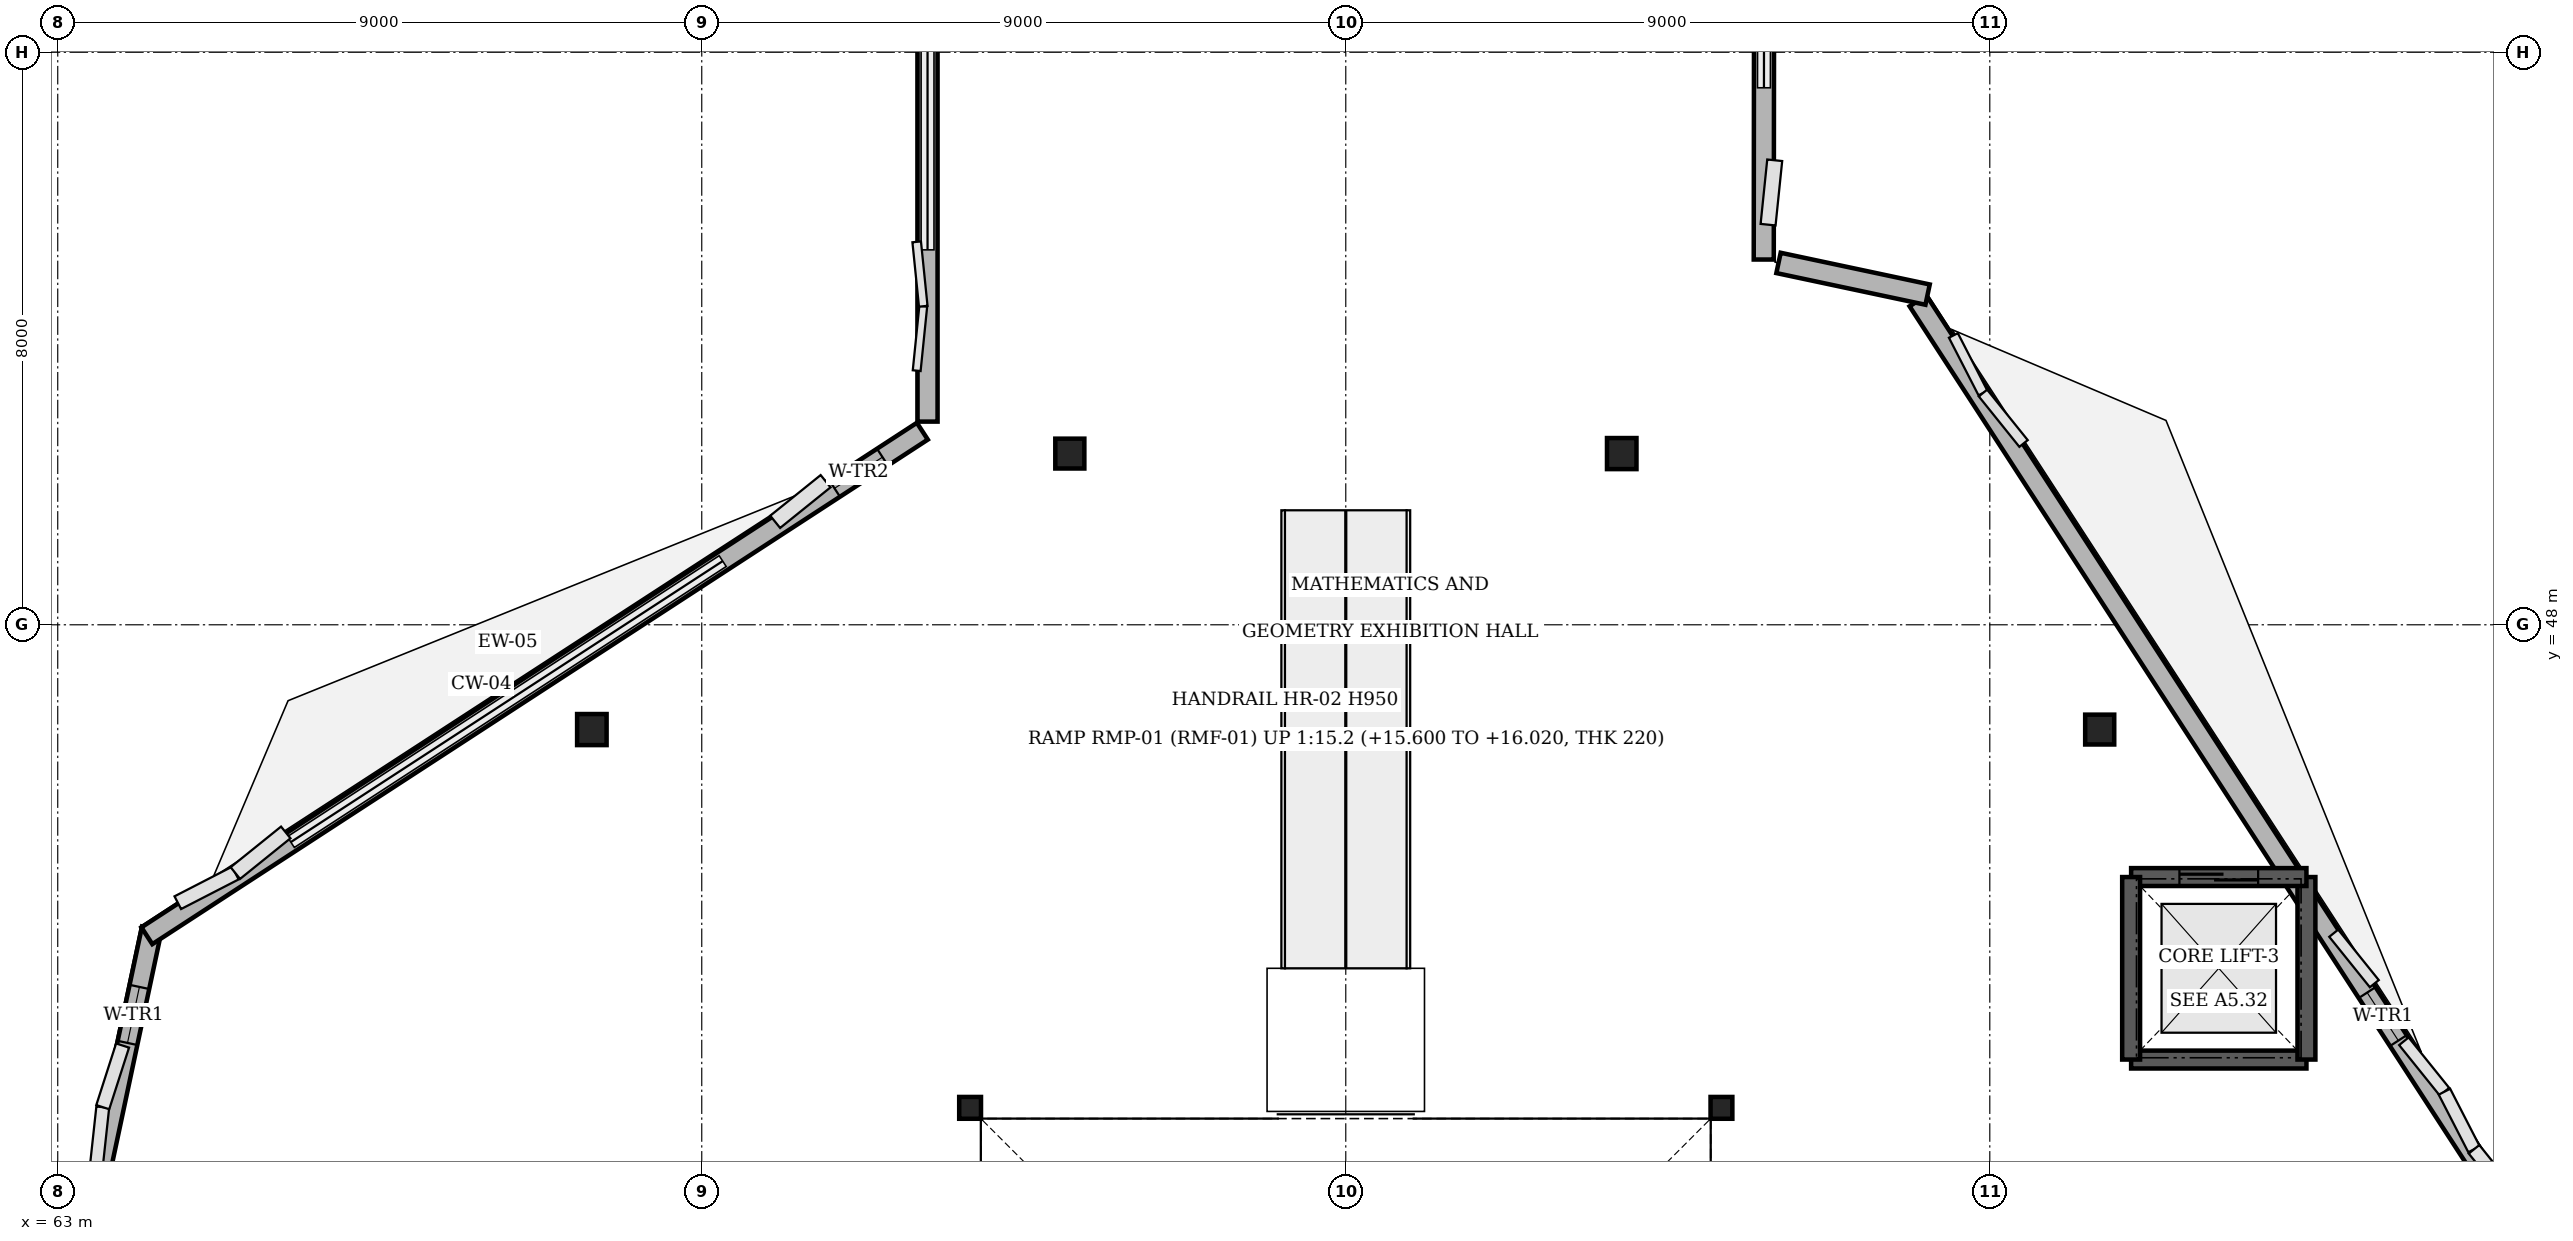
"""IFC4 building model, lengths in metres.
Left out: names, types, materials, properties, quantities, classifications, styles, units other than length and angle.
Written with IfcOpenShell. Run it as: python <this file> out.ifc"""

import sys

from ifc_helpers import new_model, si_unit, direction, frame, frame_2d, origin, origin_2d, place, context, subcontext, project, spatial, rectangle, hollow_rectangle, i_section, extrude, element, fill, save


model = new_model("IFC4")
c1 = context("Model", 3, precision=1e-05, world=origin(), true_north=direction((0.0, 1.0)))
c2 = subcontext(c1, "Body", "Model", "MODEL_VIEW")
j1 = project(units=[si_unit("LENGTHUNIT", "METRE"), si_unit("PLANEANGLEUNIT", "RADIAN")], contexts=[c1])
p1 = place(None, origin())
s1 = spatial("IfcSite", under=j1, at=p1, CompositionType="ELEMENT")
p2 = place(p1, origin())
s2 = spatial("IfcBuilding", under=s1, at=p2, CompositionType="ELEMENT")
p3 = place(p2, frame((0.0, 0.0, 15.6)))
s3 = spatial("IfcBuildingStorey", under=s2, at=p3, CompositionType="ELEMENT", Elevation=15.6)
p4 = place(p3, frame((91.536, 46.536, 0.0), z_axis=(0.0, 0.0, 1.0), x_axis=(1.0, 0.0, 0.0)))
e1 = element("IfcColumn", 1, at=p4, inside=s3, PredefinedType="COLUMN", context=c2, shape_type="SweptSolid", body=[
    extrude(i_section(OverallWidth=0.406, OverallDepth=0.417, WebThickness=0.03, FlangeThickness=0.044, FilletRadius=0.015, at=origin_2d()), origin(), (0.0, 0.0, 1.0), 4.8),
])
p5 = place(p3, frame((84.856, 50.392, 0.0), z_axis=(0.0, 0.0, 1.0), x_axis=(1.0, 0.0, 0.0)))
e2 = element("IfcColumn", 2, at=p5, inside=s3, PredefinedType="COLUMN", context=c2, shape_type="SweptSolid", body=[
    extrude(i_section(OverallWidth=0.412, OverallDepth=0.434, WebThickness=0.036, FlangeThickness=0.044, FilletRadius=0.015, at=origin_2d()), origin(), (0.0, 0.0, 1.0), 4.8),
])
p6 = place(p3, frame((77.144, 50.392, 0.0), z_axis=(0.0, 0.0, 1.0), x_axis=(1.0, 0.0, 0.0)))
e3 = element("IfcColumn", 3, at=p6, inside=s3, PredefinedType="COLUMN", context=c2, shape_type="SweptSolid", body=[
    extrude(i_section(OverallWidth=0.406, OverallDepth=0.417, WebThickness=0.03, FlangeThickness=0.044, FilletRadius=0.015, at=origin_2d()), origin(), (0.0, 0.0, 1.0), 4.8),
])
p7 = place(p3, frame((70.464, 46.536, 0.0), z_axis=(0.0, 0.0, 1.0), x_axis=(1.0, 0.0, 0.0)))
e4 = element("IfcColumn", 4, at=p7, inside=s3, PredefinedType="COLUMN", context=c2, shape_type="SweptSolid", body=[
    extrude(i_section(OverallWidth=0.412, OverallDepth=0.434, WebThickness=0.036, FlangeThickness=0.044, FilletRadius=0.015, at=origin_2d()), origin(), (0.0, 0.0, 1.0), 4.8),
])
for number, where, z_axis, x_axis in (
    (5, (86.25, 41.25, 0.0), (0.0, 0.0, 1.0), (1.0, 0.0, 0.0)),
    (6, (75.75, 41.25, 0.0), (0.0, 0.0, 1.0), (1.0, 0.0, 0.0)),
):
    element("IfcColumn", number, at=place(p3, frame(where, z_axis=z_axis, x_axis=x_axis)), inside=s3, PredefinedType="COLUMN", context=c2, shape_type="SweptSolid", body=[
        extrude(hollow_rectangle(XDim=0.305, YDim=0.305, WallThickness=0.015, InnerFilletRadius=0.015, OuterFilletRadius=0.029, at=origin_2d()), origin(), (0.0, 0.0, 1.0), 4.8),
    ])
p8 = place(p3, frame((62.492, 35.179, 0.0), z_axis=(0.0, 0.0, 1.0), x_axis=(0.207914369418, 0.978147031376, 0.0)))
e7 = element("IfcWall", 7, at=p8, inside=s3, PredefinedType="SOLIDWALL", context=c2, shape_type="SweptSolid", body=[
    extrude(rectangle(XDim=8.768, YDim=0.28, at=frame_2d((4.384, 0.0))), origin(), (0.0, 0.0, 1.0), 3.624),
])
p9 = place(p8, frame((2.609, 0.0, 1.05)))
e8 = element("IfcOpeningElement", 8, at=p9, cuts=e7, PredefinedType="OPENING", context=c2, shape_type="SweptSolid", body=[
    extrude(rectangle(XDim=0.85, YDim=1.6, at=frame_2d((0.425, 0.8))), frame((0.0, 0.15, 0.0), z_axis=(0.0, -1.0, 0.0), x_axis=(1.0, 0.0, 0.0)), (0.0, 0.0, 1.0), 0.3),
])
p10 = place(p8, frame((7.134, 0.0, 1.05)))
e9 = element("IfcOpeningElement", 9, at=p10, cuts=e7, PredefinedType="OPENING", context=c2, shape_type="SweptSolid", body=[
    extrude(rectangle(XDim=0.8, YDim=1.5, at=frame_2d((0.4, 0.75))), frame((0.0, 0.15, 0.0), z_axis=(0.0, -1.0, 0.0), x_axis=(1.0, 0.0, 0.0)), (0.0, 0.0, 1.0), 0.3),
])
p11 = place(p3, frame((64.246, 43.655, 0.0), z_axis=(0.0, 0.0, 1.0), x_axis=(0.838220921462, 0.545330804947, 0.0)))
e10 = element("IfcWall", 10, at=p11, inside=s3, PredefinedType="SOLIDWALL", context=c2, shape_type="SweptSolid", body=[
    extrude(rectangle(XDim=12.928, YDim=0.28, at=frame_2d((6.464, 0.0))), origin(), (0.0, 0.0, 1.0), 2.45),
])
p12 = place(p11, frame((11.464, 0.0, 0.6)))
e11 = element("IfcOpeningElement", 11, at=p12, cuts=e10, PredefinedType="OPENING", context=c2, shape_type="SweptSolid", body=[
    extrude(rectangle(XDim=0.8, YDim=1.7, at=frame_2d((0.4, 0.85))), frame((0.0, 0.15, 0.0), z_axis=(0.0, -1.0, 0.0), x_axis=(1.0, 0.0, 0.0)), (0.0, 0.0, 1.0), 0.3),
])
p13 = place(p3, frame((75.155, 50.839, 0.0), z_axis=(0.0, 0.0, 1.0), x_axis=(1.8602921e-05, 0.999999999827, 0.0)))
e12 = element("IfcWall", 12, at=p13, inside=s3, PredefinedType="SOLIDWALL", context=c2, shape_type="SweptSolid", body=[
    extrude(rectangle(XDim=13.124, YDim=0.28, at=frame_2d((6.562, 0.0))), origin(), (0.0, 0.0, 1.0), 2.45),
])
p14 = place(p13, frame((11.537, 0.0, 0.6)))
e13 = element("IfcOpeningElement", 13, at=p14, cuts=e12, PredefinedType="OPENING", context=c2, shape_type="SweptSolid", body=[
    extrude(rectangle(XDim=0.85, YDim=1.6, at=frame_2d((0.425, 0.8))), frame((0.0, 0.15, 0.0), z_axis=(0.0, -1.0, 0.0), x_axis=(1.0, 0.0, 0.0)), (0.0, 0.0, 1.0), 0.3),
])
p15 = place(p3, frame((88.997, 52.527, 0.0), z_axis=(0.0, 0.0, 1.0), x_axis=(0.544625508959, -0.838679351714, 0.0)))
e14 = element("IfcWall", 14, at=p15, inside=s3, PredefinedType="SOLIDWALL", context=c2, shape_type="SweptSolid", body=[
    extrude(rectangle(XDim=18.45, YDim=0.28, at=frame_2d((9.225, 0.0))), origin(), (0.0, 0.0, 1.0), 3.629),
])
p16 = place(p15, frame((11.525, 0.0, 1.05)))
e15 = element("IfcOpeningElement", 15, at=p16, cuts=e14, PredefinedType="OPENING", context=c2, shape_type="SweptSolid", body=[
    extrude(rectangle(XDim=0.8, YDim=1.5, at=frame_2d((0.4, 0.75))), frame((0.0, 0.15, 0.0), z_axis=(0.0, -1.0, 0.0), x_axis=(1.0, 0.0, 0.0)), (0.0, 0.0, 1.0), 0.3),
])
p17 = place(p15, frame((16.025, 0.0, 1.05)))
e16 = element("IfcOpeningElement", 16, at=p17, cuts=e14, PredefinedType="OPENING", context=c2, shape_type="SweptSolid", body=[
    extrude(rectangle(XDim=0.8, YDim=1.7, at=frame_2d((0.4, 0.85))), frame((0.0, 0.15, 0.0), z_axis=(0.0, -1.0, 0.0), x_axis=(1.0, 0.0, 0.0)), (0.0, 0.0, 1.0), 0.3),
])
p18 = place(p3, frame((86.854, 63.978, 0.0), z_axis=(0.0, 0.0, 1.0), x_axis=(-0.001144986004, -0.999999344503, 0.0)))
e17 = element("IfcWall", 17, at=p18, inside=s3, PredefinedType="SOLIDWALL", context=c2, shape_type="SweptSolid", body=[
    extrude(rectangle(XDim=10.875, YDim=0.28, at=frame_2d((5.437, 0.0))), origin(), (0.0, 0.0, 1.0), 2.45),
])
p19 = place(p3, frame((87.048, 53.056, 0.0), z_axis=(0.0, 0.0, 1.0), x_axis=(0.978141659003, -0.207939642498, 0.0)))
e18 = element("IfcWall", 18, at=p19, inside=s3, PredefinedType="SOLIDWALL", context=c2, shape_type="SweptSolid", body=[
    extrude(rectangle(XDim=2.13, YDim=0.29, at=frame_2d((1.065, 0.0))), origin(), (0.0, 0.0, 1.0), 4.13),
])
p20 = place(p3, frame((91.975, 41.925, 0.0), z_axis=(0.0, 0.0, 1.0), x_axis=(1.0, 0.0, 0.0)))
e19 = element("IfcWall", 19, at=p20, inside=s3, PredefinedType="SOLIDWALL", context=c2, shape_type="SweptSolid", body=[
    extrude(rectangle(XDim=2.45, YDim=0.25, at=frame_2d((1.225, 0.0))), origin(), (0.0, 0.0, 1.0), 4.8),
])
p21 = place(p3, frame((94.425, 41.925, 0.0), z_axis=(0.0, 0.0, 1.0), x_axis=(0.0, 1.0, 0.0)))
e20 = element("IfcWall", 20, at=p21, inside=s3, PredefinedType="SOLIDWALL", context=c2, shape_type="SweptSolid", body=[
    extrude(rectangle(XDim=2.55, YDim=0.25, at=frame_2d((1.275, 0.0))), origin(), (0.0, 0.0, 1.0), 4.8),
])
p22 = place(p3, frame((94.425, 44.475, 0.0), z_axis=(0.0, 0.0, 1.0), x_axis=(-1.0, 0.0, 0.0)))
e21 = element("IfcWall", 21, at=p22, inside=s3, PredefinedType="SOLIDWALL", context=c2, shape_type="SweptSolid", body=[
    extrude(rectangle(XDim=2.45, YDim=0.25, at=frame_2d((1.225, 0.0))), origin(), (0.0, 0.0, 1.0), 4.8),
])
p23 = place(p22, frame((0.675, 0.0, 0.0)))
e22 = element("IfcOpeningElement", 22, at=p23, cuts=e21, PredefinedType="OPENING", context=c2, shape_type="SweptSolid", body=[
    extrude(rectangle(XDim=1.1, YDim=2.2, at=frame_2d((0.55, 1.1))), frame((0.0, 0.135, 0.0), z_axis=(0.0, -1.0, 0.0), x_axis=(1.0, 0.0, 0.0)), (0.0, 0.0, 1.0), 0.27),
])
p24 = place(p3, frame((91.975, 44.475, 0.0), z_axis=(0.0, 0.0, 1.0), x_axis=(0.0, -1.0, 0.0)))
e23 = element("IfcWall", 23, at=p24, inside=s3, PredefinedType="SOLIDWALL", context=c2, shape_type="SweptSolid", body=[
    extrude(rectangle(XDim=2.55, YDim=0.25, at=frame_2d((1.275, 0.0))), origin(), (0.0, 0.0, 1.0), 4.8),
])
p25 = place(p10, origin())
e24 = element("IfcWindow", 24, at=p25, inside=s3, PartitioningType="SINGLE_PANEL", PredefinedType="WINDOW", context=c2, shape_type="SweptSolid", body=[
    extrude(rectangle(XDim=0.8, YDim=1.5, at=frame_2d((0.4, 0.75))), frame((0.0, 0.03, 0.0), z_axis=(0.0, -1.0, 0.0), x_axis=(1.0, 0.0, 0.0)), (0.0, 0.0, 1.0), 0.06),
])
fill(e9, e24)
p26 = place(p12, origin())
e25 = element("IfcWindow", 25, at=p26, inside=s3, PartitioningType="SINGLE_PANEL", PredefinedType="WINDOW", context=c2, shape_type="SweptSolid", body=[
    extrude(rectangle(XDim=0.8, YDim=1.7, at=frame_2d((0.4, 0.85))), frame((0.0, 0.03, 0.0), z_axis=(0.0, -1.0, 0.0), x_axis=(1.0, 0.0, 0.0)), (0.0, 0.0, 1.0), 0.06),
])
fill(e11, e25)
p27 = place(p16, origin())
e26 = element("IfcWindow", 26, at=p27, inside=s3, PartitioningType="SINGLE_PANEL", PredefinedType="WINDOW", context=c2, shape_type="SweptSolid", body=[
    extrude(rectangle(XDim=0.8, YDim=1.5, at=frame_2d((0.4, 0.75))), frame((0.0, 0.03, 0.0), z_axis=(0.0, -1.0, 0.0), x_axis=(1.0, 0.0, 0.0)), (0.0, 0.0, 1.0), 0.06),
])
fill(e15, e26)
p28 = place(p23, origin())
e27 = element("IfcDoor", 27, at=p28, inside=s3, OperationType="SLIDING_TO_LEFT", PredefinedType="DOOR", context=c2, shape_type="SweptSolid", body=[
    extrude(rectangle(XDim=1.1, YDim=2.2, at=frame_2d((0.55, 1.1))), frame((0.0, 0.025, 0.0), z_axis=(0.0, -1.0, 0.0), x_axis=(1.0, 0.0, 0.0)), (0.0, 0.0, 1.0), 0.05),
])
fill(e22, e27)
save(model, sys.argv[1])
